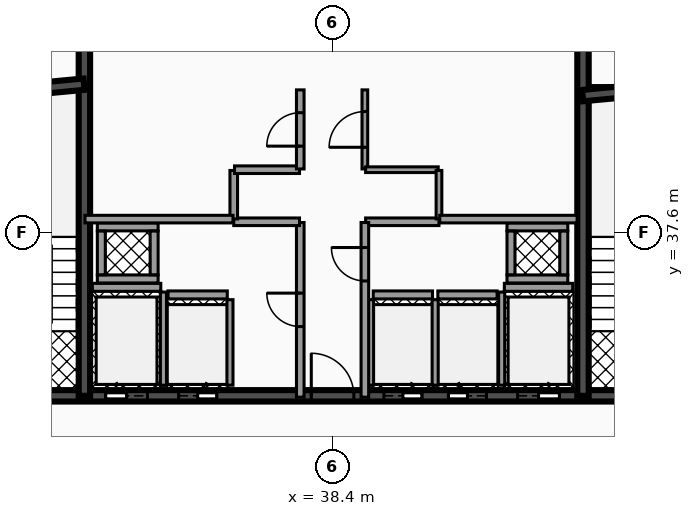
"""IFC4 building model, lengths in metres.
Left out: names, types, materials, properties, quantities, classifications, styles, units other than length and angle.
Written with IfcOpenShell. Run it as: python <this file> out.ifc"""

import sys

from ifc_helpers import new_model, si_unit, direction, frame, frame_2d, origin, place, context, subcontext, project, spatial, rectangle, extrude, element, fill, save


model = new_model("IFC4")
c1 = context("Model", 3, precision=1e-05, world=origin(), true_north=direction((0.0, 1.0)))
c2 = subcontext(c1, "Body", "Model", "MODEL_VIEW")
j1 = project(units=[si_unit("LENGTHUNIT", "METRE"), si_unit("PLANEANGLEUNIT", "RADIAN")], contexts=[c1])
p1 = place(None, origin())
s1 = spatial("IfcSite", under=j1, at=p1, CompositionType="ELEMENT")
p2 = place(p1, origin())
s2 = spatial("IfcBuilding", under=s1, at=p2, CompositionType="ELEMENT")
p3 = place(p2, frame((0.0, 0.0, 235.96)))
s3 = spatial("IfcBuildingStorey", under=s2, at=p3, CompositionType="ELEMENT", Elevation=235.96)
p4 = place(p3, frame((28.5, 33.3, 0.0), z_axis=(0.0, 0.0, 1.0), x_axis=(1.0, 0.0, 0.0)))
e1 = element("IfcWall", 1, at=p4, inside=s3, PredefinedType="SHEAR", context=c2, shape_type="SweptSolid", body=[
    extrude(rectangle(XDim=19.86, YDim=0.3, at=frame_2d((9.93, 0.0))), origin(), (0.0, 0.0, 1.0), 3.18),
])
p5 = place(p4, frame((3.93, 0.0, 0.0)))
e2 = element("IfcOpeningElement", 2, at=p5, cuts=e1, PredefinedType="OPENING", context=c2, shape_type="SweptSolid", body=[
    extrude(rectangle(XDim=1.1, YDim=2.15, at=frame_2d((0.55, 1.075))), frame((0.0, 0.16, 0.0), z_axis=(0.0, -1.0, 0.0), x_axis=(1.0, 0.0, 0.0)), (0.0, 0.0, 1.0), 0.32),
])
p6 = place(p4, frame((14.77, 0.0, 0.0)))
e3 = element("IfcOpeningElement", 3, at=p6, cuts=e1, PredefinedType="OPENING", context=c2, shape_type="SweptSolid", body=[
    extrude(rectangle(XDim=1.1, YDim=2.15, at=frame_2d((0.55, 1.075))), frame((0.0, 0.16, 0.0), z_axis=(0.0, -1.0, 0.0), x_axis=(1.0, 0.0, 0.0)), (0.0, 0.0, 1.0), 0.32),
])
p7 = place(p4, frame((11.25, 0.0, 0.0)))
e4 = element("IfcOpeningElement", 4, at=p7, cuts=e1, PredefinedType="OPENING", context=c2, shape_type="SweptSolid", body=[
    extrude(rectangle(XDim=1.0, YDim=2.1, at=frame_2d((0.5, 1.05))), frame((0.0, 0.16, 0.0), z_axis=(0.0, -1.0, 0.0), x_axis=(1.0, 0.0, 0.0)), (0.0, 0.0, 1.0), 0.32),
])
p8 = place(p4, frame((12.95, 0.0, 0.0)))
e5 = element("IfcOpeningElement", 5, at=p8, cuts=e1, PredefinedType="OPENING", context=c2, shape_type="SweptSolid", body=[
    extrude(rectangle(XDim=1.0, YDim=2.1, at=frame_2d((0.5, 1.05))), frame((0.0, 0.16, 0.0), z_axis=(0.0, -1.0, 0.0), x_axis=(1.0, 0.0, 0.0)), (0.0, 0.0, 1.0), 0.32),
])
p9 = place(p4, frame((5.85, 0.0, 0.0)))
e6 = element("IfcOpeningElement", 6, at=p9, cuts=e1, PredefinedType="OPENING", context=c2, shape_type="SweptSolid", body=[
    extrude(rectangle(XDim=1.0, YDim=2.1, at=frame_2d((0.5, 1.05))), frame((0.0, 0.16, 0.0), z_axis=(0.0, -1.0, 0.0), x_axis=(1.0, 0.0, 0.0)), (0.0, 0.0, 1.0), 0.32),
])
p10 = place(p4, frame((1.21, 0.0, 0.0)))
e7 = element("IfcOpeningElement", 7, at=p10, cuts=e1, PredefinedType="OPENING", context=c2, shape_type="SweptSolid", body=[
    extrude(rectangle(XDim=1.1, YDim=2.2, at=frame_2d((0.55, 1.1))), frame((0.0, 0.16, 0.0), z_axis=(0.0, -1.0, 0.0), x_axis=(1.0, 0.0, 0.0)), (0.0, 0.0, 1.0), 0.32),
])
p11 = place(p4, frame((9.34, 0.0, 0.0)))
e8 = element("IfcOpeningElement", 8, at=p11, cuts=e1, PredefinedType="OPENING", context=c2, shape_type="SweptSolid", body=[
    extrude(rectangle(XDim=1.12, YDim=2.05, at=frame_2d((0.56, 1.025))), frame((0.0, 0.16, 0.0), z_axis=(0.0, -1.0, 0.0), x_axis=(1.0, 0.0, 0.0)), (0.0, 0.0, 1.0), 0.32),
])
p12 = place(p4, frame((17.55, 0.0, 0.0)))
e9 = element("IfcOpeningElement", 9, at=p12, cuts=e1, PredefinedType="OPENING", context=c2, shape_type="SweptSolid", body=[
    extrude(rectangle(XDim=1.1, YDim=2.2, at=frame_2d((0.55, 1.1))), frame((0.0, 0.16, 0.0), z_axis=(0.0, -1.0, 0.0), x_axis=(1.0, 0.0, 0.0)), (0.0, 0.0, 1.0), 0.32),
])
for number, where, z_axis, x_axis in (
    (10, (31.87, 33.3, 0.0), (0.0, 0.0, 1.0), (0.0, 1.0, 0.0)),
    (11, (44.99, 33.3, 0.0), (0.0, 0.0, 1.0), (0.0, 1.0, 0.0)),
):
    element("IfcWall", number, at=place(p3, frame(where, z_axis=z_axis, x_axis=x_axis)), inside=s3, PredefinedType="SHEAR", context=c2, shape_type="SweptSolid", body=[
        extrude(rectangle(XDim=10.1, YDim=0.3, at=frame_2d((5.05, 0.0))), origin(), (0.0, 0.0, 1.0), 3.18),
    ])
p13 = place(p3, frame((28.64, 41.2, 0.0), z_axis=(0.0, 0.0, 1.0), x_axis=(0.995687118776, 0.092774789157, 0.0)))
e12 = element("IfcWall", 12, at=p13, inside=s3, PredefinedType="SHEAR", context=c2, shape_type="SweptSolid", body=[
    extrude(rectangle(XDim=3.234, YDim=0.3, at=frame_2d((1.617, 0.0))), origin(), (0.0, 0.0, 1.0), 3.18),
])
p14 = place(p3, frame((44.98, 41.2, 0.0), z_axis=(0.0, 0.0, 1.0), x_axis=(0.995686468965, 0.09278176286, 0.0)))
e13 = element("IfcWall", 13, at=p14, inside=s3, PredefinedType="SHEAR", context=c2, shape_type="SweptSolid", body=[
    extrude(rectangle(XDim=3.234, YDim=0.3, at=frame_2d((1.617, 0.0))), origin(), (0.0, 0.0, 1.0), 3.18),
])
p15 = place(p3, frame((32.08, 36.155, 0.0), z_axis=(0.0, 0.0, 1.0), x_axis=(1.0, 0.0, 0.0)))
e14 = element("IfcWall", 14, at=p15, inside=s3, PredefinedType="SOLIDWALL", context=c2, shape_type="SweptSolid", body=[
    extrude(rectangle(XDim=1.8, YDim=0.21, at=frame_2d((0.9, 0.0))), origin(), (0.0, 0.0, 1.0), 3.18),
])
p16 = place(p3, frame((33.95, 33.58, 0.0), z_axis=(0.0, 0.0, 1.0), x_axis=(0.0, 1.0, 0.0)))
e15 = element("IfcWall", 15, at=p16, inside=s3, PredefinedType="SOLIDWALL", context=c2, shape_type="SweptSolid", body=[
    extrude(rectangle(XDim=2.45, YDim=0.16, at=frame_2d((1.225, 0.0))), origin(), (0.0, 0.0, 1.0), 3.18),
])
p17 = place(p3, frame((42.92, 36.155, 0.0), z_axis=(0.0, 0.0, 1.0), x_axis=(1.0, 0.0, 0.0)))
e16 = element("IfcWall", 16, at=p17, inside=s3, PredefinedType="SOLIDWALL", context=c2, shape_type="SweptSolid", body=[
    extrude(rectangle(XDim=1.8, YDim=0.21, at=frame_2d((0.9, 0.0))), origin(), (0.0, 0.0, 1.0), 3.18),
])
p18 = place(p3, frame((42.85, 33.58, 0.0), z_axis=(0.0, 0.0, 1.0), x_axis=(0.0, 1.0, 0.0)))
e17 = element("IfcWall", 17, at=p18, inside=s3, PredefinedType="SOLIDWALL", context=c2, shape_type="SweptSolid", body=[
    extrude(rectangle(XDim=2.45, YDim=0.16, at=frame_2d((1.225, 0.0))), origin(), (0.0, 0.0, 1.0), 3.18),
])
p19 = place(p3, frame((39.47, 35.955, 0.0), z_axis=(0.0, 0.0, 1.0), x_axis=(1.0, 0.0, 0.0)))
e18 = element("IfcWall", 18, at=p19, inside=s3, PredefinedType="SOLIDWALL", context=c2, shape_type="SweptSolid", body=[
    extrude(rectangle(XDim=1.56, YDim=0.21, at=frame_2d((0.78, 0.0))), origin(), (0.0, 0.0, 1.0), 3.18),
])
for number, where, z_axis, x_axis in (
    (19, (39.4, 33.58, 0.0), (0.0, 0.0, 1.0), (0.0, 1.0, 0.0)),
    (20, (41.1, 33.58, 0.0), (0.0, 0.0, 1.0), (0.0, 1.0, 0.0)),
):
    element("IfcWall", number, at=place(p3, frame(where, z_axis=z_axis, x_axis=x_axis)), inside=s3, PredefinedType="SOLIDWALL", context=c2, shape_type="SweptSolid", body=[
        extrude(rectangle(XDim=2.25, YDim=0.16, at=frame_2d((1.125, 0.0))), origin(), (0.0, 0.0, 1.0), 3.18),
    ])
p20 = place(p3, frame((41.17, 35.955, 0.0), z_axis=(0.0, 0.0, 1.0), x_axis=(1.0, 0.0, 0.0)))
e21 = element("IfcWall", 21, at=p20, inside=s3, PredefinedType="SOLIDWALL", context=c2, shape_type="SweptSolid", body=[
    extrude(rectangle(XDim=1.56, YDim=0.21, at=frame_2d((0.78, 0.0))), origin(), (0.0, 0.0, 1.0), 3.18),
])
p21 = place(p3, frame((34.07, 35.955, 0.0), z_axis=(0.0, 0.0, 1.0), x_axis=(1.0, 0.0, 0.0)))
e22 = element("IfcWall", 22, at=p21, inside=s3, PredefinedType="SOLIDWALL", context=c2, shape_type="SweptSolid", body=[
    extrude(rectangle(XDim=1.56, YDim=0.21, at=frame_2d((0.78, 0.0))), origin(), (0.0, 0.0, 1.0), 3.18),
])
p22 = place(p3, frame((35.7, 33.58, 0.0), z_axis=(0.0, 0.0, 1.0), x_axis=(0.0, 1.0, 0.0)))
e23 = element("IfcWall", 23, at=p22, inside=s3, PredefinedType="SOLIDWALL", context=c2, shape_type="SweptSolid", body=[
    extrude(rectangle(XDim=2.25, YDim=0.16, at=frame_2d((1.125, 0.0))), origin(), (0.0, 0.0, 1.0), 3.18),
])
for number, where, z_axis, x_axis in (
    (24, (32.21, 36.375, 0.0), (0.0, 0.0, 1.0), (1.0, 0.0, 0.0)),
    (25, (32.21, 37.745, 0.0), (0.0, 0.0, 1.0), (1.0, 0.0, 0.0)),
):
    element("IfcWall", number, at=place(p3, frame(where, z_axis=z_axis, x_axis=x_axis)), inside=s3, PredefinedType="SOLIDWALL", context=c2, shape_type="SweptSolid", body=[
        extrude(rectangle(XDim=1.6, YDim=0.21, at=frame_2d((0.8, 0.0))), origin(), (0.0, 0.0, 1.0), 3.18),
    ])
for number, where, z_axis, x_axis in (
    (26, (32.315, 36.485, 0.0), (0.0, 0.0, 1.0), (0.0, 1.0, 0.0)),
    (27, (33.705, 36.485, 0.0), (0.0, 0.0, 1.0), (0.0, 1.0, 0.0)),
):
    element("IfcWall", number, at=place(p3, frame(where, z_axis=z_axis, x_axis=x_axis)), inside=s3, PredefinedType="SOLIDWALL", context=c2, shape_type="SweptSolid", body=[
        extrude(rectangle(XDim=1.15, YDim=0.21, at=frame_2d((0.575, 0.0))), origin(), (0.0, 0.0, 1.0), 3.18),
    ])
for number, where, z_axis, x_axis in (
    (28, (42.99, 36.375, 0.0), (0.0, 0.0, 1.0), (1.0, 0.0, 0.0)),
    (29, (42.99, 37.745, 0.0), (0.0, 0.0, 1.0), (1.0, 0.0, 0.0)),
):
    element("IfcWall", number, at=place(p3, frame(where, z_axis=z_axis, x_axis=x_axis)), inside=s3, PredefinedType="SOLIDWALL", context=c2, shape_type="SweptSolid", body=[
        extrude(rectangle(XDim=1.6, YDim=0.21, at=frame_2d((0.8, 0.0))), origin(), (0.0, 0.0, 1.0), 3.18),
    ])
for number, where, z_axis, x_axis in (
    (30, (43.095, 36.485, 0.0), (0.0, 0.0, 1.0), (0.0, 1.0, 0.0)),
    (31, (44.485, 36.485, 0.0), (0.0, 0.0, 1.0), (0.0, 1.0, 0.0)),
):
    element("IfcWall", number, at=place(p3, frame(where, z_axis=z_axis, x_axis=x_axis)), inside=s3, PredefinedType="SOLIDWALL", context=c2, shape_type="SweptSolid", body=[
        extrude(rectangle(XDim=1.15, YDim=0.21, at=frame_2d((0.575, 0.0))), origin(), (0.0, 0.0, 1.0), 3.18),
    ])
p23 = place(p3, frame((37.55, 33.265, 0.0), z_axis=(0.0, 0.0, 1.0), x_axis=(0.0, 1.0, 0.0)))
e32 = element("IfcWall", 32, at=p23, inside=s3, PredefinedType="PARTITIONING", context=c2, shape_type="SweptSolid", body=[
    extrude(rectangle(XDim=4.595, YDim=0.2, at=frame_2d((2.298, 0.0))), origin(), (0.0, 0.0, 1.0), 2.235),
])
p24 = place(p23, frame((1.857, 0.0, 0.0)))
e33 = element("IfcOpeningElement", 33, at=p24, cuts=e32, PredefinedType="OPENING", context=c2, shape_type="SweptSolid", body=[
    extrude(rectangle(XDim=0.88, YDim=2.05, at=frame_2d((0.44, 1.025))), frame((0.0, 0.11, 0.0), z_axis=(0.0, -1.0, 0.0), x_axis=(1.0, 0.0, 0.0)), (0.0, 0.0, 1.0), 0.22),
])
p25 = place(p3, frame((35.8, 37.88, 0.0), z_axis=(0.0, 0.0, 1.0), x_axis=(1.0, 0.0, 0.0)))
e34 = element("IfcWall", 34, at=p25, inside=s3, PredefinedType="PARTITIONING", context=c2, shape_type="SweptSolid", body=[
    extrude(rectangle(XDim=1.73, YDim=0.2, at=frame_2d((0.865, 0.0))), origin(), (0.0, 0.0, 1.0), 2.235),
])
p26 = place(p3, frame((35.8, 37.955, 0.0), z_axis=(0.0, 0.0, 1.0), x_axis=(0.0, 1.0, 0.0)))
e35 = element("IfcWall", 35, at=p26, inside=s3, PredefinedType="PARTITIONING", context=c2, shape_type="SweptSolid", body=[
    extrude(rectangle(XDim=1.275, YDim=0.2, at=frame_2d((0.637, 0.0))), origin(), (0.0, 0.0, 1.0), 2.235),
])
p27 = place(p3, frame((35.82, 39.25, 0.0), z_axis=(0.0, 0.0, 1.0), x_axis=(1.0, 0.0, 0.0)))
e36 = element("IfcWall", 36, at=p27, inside=s3, PredefinedType="PARTITIONING", context=c2, shape_type="SweptSolid", body=[
    extrude(rectangle(XDim=1.71, YDim=0.2, at=frame_2d((0.855, 0.0))), origin(), (0.0, 0.0, 1.0), 2.235),
])
p28 = place(p3, frame((37.55, 39.27, 0.0), z_axis=(0.0, 0.0, 1.0), x_axis=(0.0, 1.0, 0.0)))
e37 = element("IfcWall", 37, at=p28, inside=s3, PredefinedType="PARTITIONING", context=c2, shape_type="SweptSolid", body=[
    extrude(rectangle(XDim=2.08, YDim=0.2, at=frame_2d((1.04, 0.0))), origin(), (0.0, 0.0, 1.0), 2.235),
])
p29 = place(p28, frame((0.6, 0.0, 0.0)))
e38 = element("IfcOpeningElement", 38, at=p29, cuts=e37, PredefinedType="OPENING", context=c2, shape_type="SweptSolid", body=[
    extrude(rectangle(XDim=0.88, YDim=2.05, at=frame_2d((0.44, 1.025))), frame((0.0, 0.11, 0.0), z_axis=(0.0, -1.0, 0.0), x_axis=(1.0, 0.0, 0.0)), (0.0, 0.0, 1.0), 0.22),
])
p30 = place(p3, frame((39.27, 37.88, 0.0), z_axis=(0.0, 0.0, 1.0), x_axis=(1.0, 0.0, 0.0)))
e39 = element("IfcWall", 39, at=p30, inside=s3, PredefinedType="PARTITIONING", context=c2, shape_type="SweptSolid", body=[
    extrude(rectangle(XDim=1.93, YDim=0.2, at=frame_2d((0.965, 0.0))), origin(), (0.0, 0.0, 1.0), 2.235),
])
p31 = place(p3, frame((39.25, 33.265, 0.0), z_axis=(0.0, 0.0, 1.0), x_axis=(0.0, 1.0, 0.0)))
e40 = element("IfcWall", 40, at=p31, inside=s3, PredefinedType="PARTITIONING", context=c2, shape_type="SweptSolid", body=[
    extrude(rectangle(XDim=4.595, YDim=0.2, at=frame_2d((2.298, 0.0))), origin(), (0.0, 0.0, 1.0), 2.235),
])
p32 = place(p31, frame((3.058, 0.0, 0.0)))
e41 = element("IfcOpeningElement", 41, at=p32, cuts=e40, PredefinedType="OPENING", context=c2, shape_type="SweptSolid", body=[
    extrude(rectangle(XDim=0.88, YDim=2.05, at=frame_2d((0.44, 1.025))), frame((0.0, 0.11, 0.0), z_axis=(0.0, -1.0, 0.0), x_axis=(1.0, 0.0, 0.0)), (0.0, 0.0, 1.0), 0.22),
])
p33 = place(p3, frame((39.25, 39.27, 0.0), z_axis=(0.0, 0.0, 1.0), x_axis=(0.0, 1.0, 0.0)))
e42 = element("IfcWall", 42, at=p33, inside=s3, PredefinedType="PARTITIONING", context=c2, shape_type="SweptSolid", body=[
    extrude(rectangle(XDim=2.08, YDim=0.15, at=frame_2d((1.04, 0.0))), origin(), (0.0, 0.0, 1.0), 2.235),
])
p34 = place(p33, frame((0.57, 0.0, 0.0)))
e43 = element("IfcOpeningElement", 43, at=p34, cuts=e42, PredefinedType="OPENING", context=c2, shape_type="SweptSolid", body=[
    extrude(rectangle(XDim=0.94, YDim=2.05, at=frame_2d((0.47, 1.025))), frame((0.0, 0.085, 0.0), z_axis=(0.0, -1.0, 0.0), x_axis=(1.0, 0.0, 0.0)), (0.0, 0.0, 1.0), 0.17),
])
p35 = place(p3, frame((39.27, 39.25, 0.0), z_axis=(0.0, 0.0, 1.0), x_axis=(1.0, 0.0, 0.0)))
e44 = element("IfcWall", 44, at=p35, inside=s3, PredefinedType="PARTITIONING", context=c2, shape_type="SweptSolid", body=[
    extrude(rectangle(XDim=1.91, YDim=0.15, at=frame_2d((0.955, 0.0))), origin(), (0.0, 0.0, 1.0), 2.235),
])
p36 = place(p3, frame((41.2, 37.955, 0.0), z_axis=(0.0, 0.0, 1.0), x_axis=(0.0, 1.0, 0.0)))
e45 = element("IfcWall", 45, at=p36, inside=s3, PredefinedType="PARTITIONING", context=c2, shape_type="SweptSolid", body=[
    extrude(rectangle(XDim=1.275, YDim=0.15, at=frame_2d((0.637, 0.0))), origin(), (0.0, 0.0, 1.0), 2.235),
])
p37 = place(p3, frame((31.885, 37.95, 0.0), z_axis=(0.0, 0.0, 1.0), x_axis=(1.0, 0.0, 0.0)))
e46 = element("IfcWall", 46, at=p37, inside=s3, PredefinedType="PARTITIONING", context=c2, shape_type="SweptSolid", body=[
    extrude(rectangle(XDim=3.895, YDim=0.2, at=frame_2d((1.948, 0.0))), origin(), (0.0, 0.0, 1.0), 2.235),
])
p38 = place(p3, frame((41.22, 37.95, 0.0), z_axis=(0.0, 0.0, 1.0), x_axis=(1.0, 0.0, 0.0)))
e47 = element("IfcWall", 47, at=p38, inside=s3, PredefinedType="PARTITIONING", context=c2, shape_type="SweptSolid", body=[
    extrude(rectangle(XDim=3.615, YDim=0.2, at=frame_2d((1.808, 0.0))), origin(), (0.0, 0.0, 1.0), 2.235),
])
p39 = place(p5, origin())
e48 = element("IfcDoor", 48, at=p39, inside=s3, OperationType="SLIDING_TO_LEFT", PredefinedType="DOOR", context=c2, shape_type="SweptSolid", body=[
    extrude(rectangle(XDim=1.1, YDim=2.15, at=frame_2d((0.55, 1.075))), frame((0.0, 0.025, 0.0), z_axis=(0.0, -1.0, 0.0), x_axis=(1.0, 0.0, 0.0)), (0.0, 0.0, 1.0), 0.05),
])
fill(e2, e48)
p40 = place(p6, origin())
e49 = element("IfcDoor", 49, at=p40, inside=s3, OperationType="SLIDING_TO_RIGHT", PredefinedType="DOOR", context=c2, shape_type="SweptSolid", body=[
    extrude(rectangle(XDim=1.1, YDim=2.15, at=frame_2d((0.55, 1.075))), frame((0.0, 0.025, 0.0), z_axis=(0.0, -1.0, 0.0), x_axis=(1.0, 0.0, 0.0)), (0.0, 0.0, 1.0), 0.05),
])
fill(e3, e49)
p41 = place(p7, origin())
e50 = element("IfcDoor", 50, at=p41, inside=s3, OperationType="SLIDING_TO_RIGHT", PredefinedType="DOOR", context=c2, shape_type="SweptSolid", body=[
    extrude(rectangle(XDim=1.0, YDim=2.1, at=frame_2d((0.5, 1.05))), frame((0.0, 0.025, 0.0), z_axis=(0.0, -1.0, 0.0), x_axis=(1.0, 0.0, 0.0)), (0.0, 0.0, 1.0), 0.05),
])
fill(e4, e50)
p42 = place(p8, origin())
e51 = element("IfcDoor", 51, at=p42, inside=s3, OperationType="SLIDING_TO_LEFT", PredefinedType="DOOR", context=c2, shape_type="SweptSolid", body=[
    extrude(rectangle(XDim=1.0, YDim=2.1, at=frame_2d((0.5, 1.05))), frame((0.0, 0.025, 0.0), z_axis=(0.0, -1.0, 0.0), x_axis=(1.0, 0.0, 0.0)), (0.0, 0.0, 1.0), 0.05),
])
fill(e5, e51)
p43 = place(p9, origin())
e52 = element("IfcDoor", 52, at=p43, inside=s3, OperationType="SLIDING_TO_RIGHT", PredefinedType="DOOR", context=c2, shape_type="SweptSolid", body=[
    extrude(rectangle(XDim=1.0, YDim=2.1, at=frame_2d((0.5, 1.05))), frame((0.0, 0.025, 0.0), z_axis=(0.0, -1.0, 0.0), x_axis=(1.0, 0.0, 0.0)), (0.0, 0.0, 1.0), 0.05),
])
fill(e6, e52)
p44 = place(p11, origin())
e53 = element("IfcDoor", 53, at=p44, inside=s3, OperationType="SINGLE_SWING_LEFT", PredefinedType="DOOR", context=c2, shape_type="SweptSolid", body=[
    extrude(rectangle(XDim=1.12, YDim=2.05, at=frame_2d((0.56, 1.025))), frame((0.0, 0.025, 0.0), z_axis=(0.0, -1.0, 0.0), x_axis=(1.0, 0.0, 0.0)), (0.0, 0.0, 1.0), 0.05),
])
fill(e8, e53)
p45 = place(p24, origin())
e54 = element("IfcDoor", 54, at=p45, inside=s3, OperationType="SINGLE_SWING_RIGHT", PredefinedType="DOOR", context=c2, shape_type="SweptSolid", body=[
    extrude(rectangle(XDim=0.88, YDim=2.05, at=frame_2d((0.44, 1.025))), frame((0.0, 0.025, 0.0), z_axis=(0.0, -1.0, 0.0), x_axis=(1.0, 0.0, 0.0)), (0.0, 0.0, 1.0), 0.05),
])
fill(e33, e54)
p46 = place(p29, origin())
e55 = element("IfcDoor", 55, at=p46, inside=s3, OperationType="SINGLE_SWING_LEFT", PredefinedType="DOOR", context=c2, shape_type="SweptSolid", body=[
    extrude(rectangle(XDim=0.88, YDim=2.05, at=frame_2d((0.44, 1.025))), frame((0.0, 0.025, 0.0), z_axis=(0.0, -1.0, 0.0), x_axis=(1.0, 0.0, 0.0)), (0.0, 0.0, 1.0), 0.05),
])
fill(e38, e55)
p47 = place(p32, origin())
e56 = element("IfcDoor", 56, at=p47, inside=s3, OperationType="SINGLE_SWING_RIGHT", PredefinedType="DOOR", context=c2, shape_type="SweptSolid", body=[
    extrude(rectangle(XDim=0.88, YDim=2.05, at=frame_2d((0.44, 1.025))), frame((0.0, 0.025, 0.0), z_axis=(0.0, -1.0, 0.0), x_axis=(1.0, 0.0, 0.0)), (0.0, 0.0, 1.0), 0.05),
])
fill(e41, e56)
p48 = place(p34, origin())
e57 = element("IfcDoor", 57, at=p48, inside=s3, OperationType="SINGLE_SWING_LEFT", PredefinedType="DOOR", context=c2, shape_type="SweptSolid", body=[
    extrude(rectangle(XDim=0.94, YDim=2.05, at=frame_2d((0.47, 1.025))), frame((0.0, 0.025, 0.0), z_axis=(0.0, -1.0, 0.0), x_axis=(1.0, 0.0, 0.0)), (0.0, 0.0, 1.0), 0.05),
])
fill(e43, e57)
save(model, sys.argv[1])
